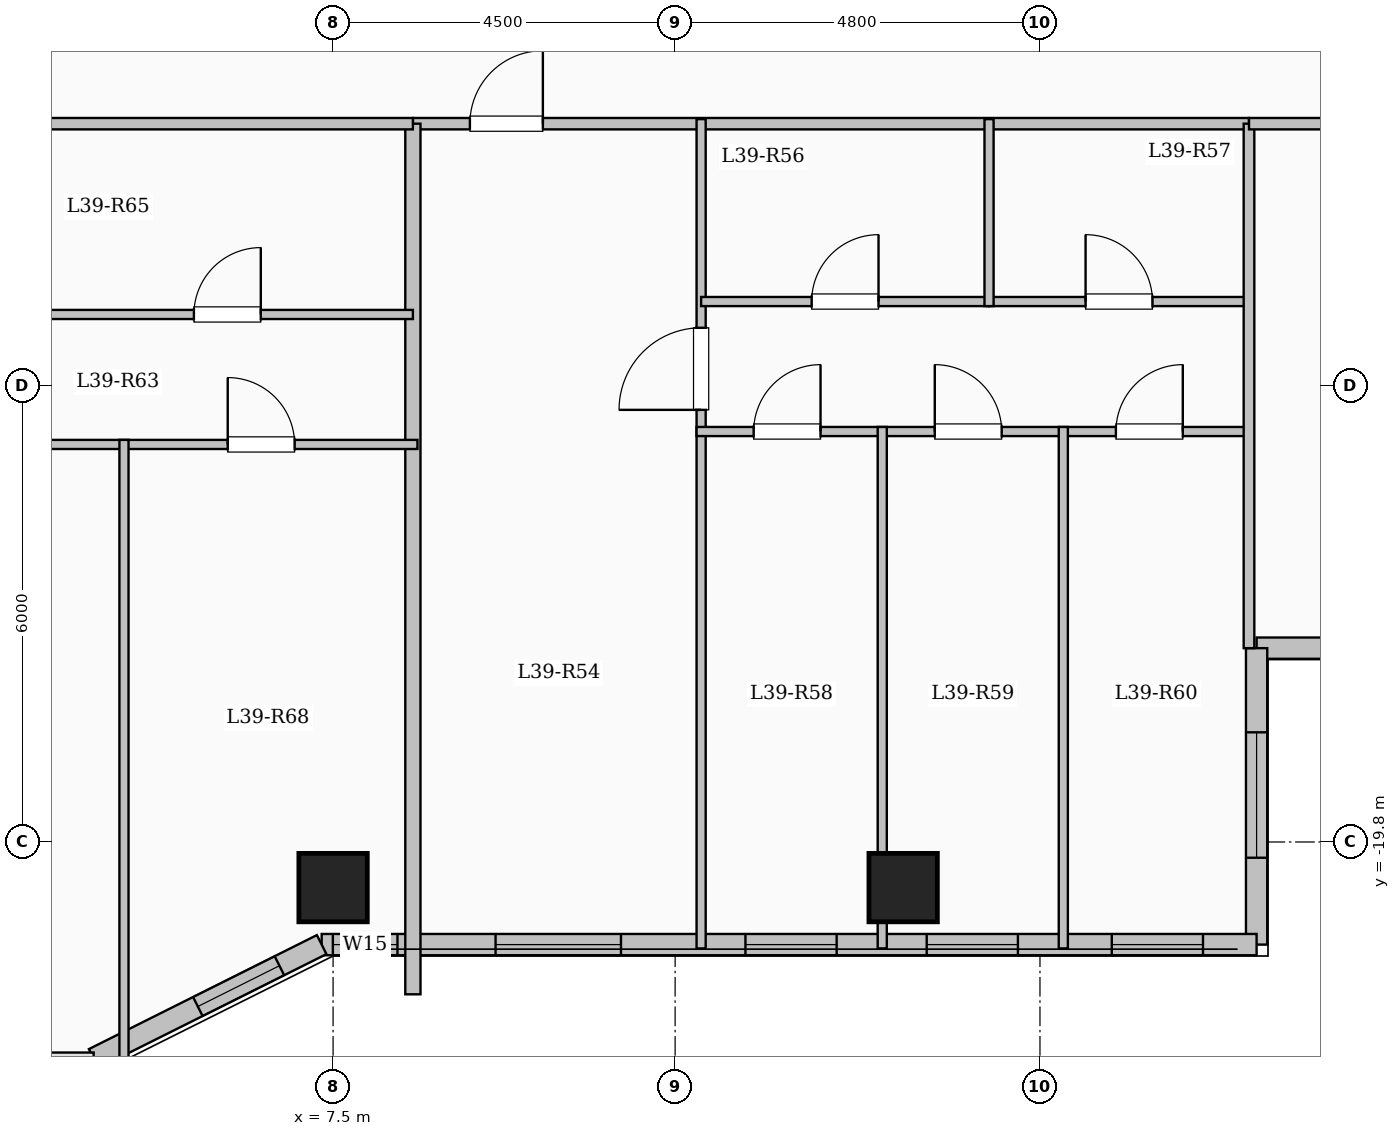
"""IFC4 building model, lengths in metres.
Left out: names, types, materials, properties, quantities, classifications, styles, units other than length and angle.
Written with IfcOpenShell. Run it as: python <this file> out.ifc"""

import sys

from ifc_helpers import new_model, si_unit, direction, frame, frame_2d, origin, origin_2d, place, context, subcontext, project, spatial, rectangle, extrude, element, fill, save


model = new_model("IFC4")
c1 = context("Model", 3, precision=1e-05, world=origin(), true_north=direction((0.0, 1.0)))
c2 = subcontext(c1, "Body", "Model", "MODEL_VIEW")
j1 = project(units=[si_unit("LENGTHUNIT", "METRE"), si_unit("PLANEANGLEUNIT", "RADIAN")], contexts=[c1])
p1 = place(None, origin())
s1 = spatial("IfcSite", under=j1, at=p1, CompositionType="ELEMENT")
p2 = place(p1, origin())
s2 = spatial("IfcBuilding", under=s1, at=p2, CompositionType="ELEMENT")
p3 = place(p2, frame((0.0, 0.0, 146.0)))
s3 = spatial("IfcBuildingStorey", under=s2, at=p3, CompositionType="ELEMENT", Elevation=146.0)
for number, where, z_axis, x_axis in (
    (1, (7.5, -20.4, 0.0), (0.0, 0.0, 1.0), (1.0, 0.0, 0.0)),
    (2, (15.0, -20.4, 0.0), (0.0, 0.0, 1.0), (1.0, 0.0, 0.0)),
):
    element("IfcColumn", number, at=place(p3, frame(where, z_axis=z_axis, x_axis=x_axis)), inside=s3, PredefinedType="COLUMN", context=c2, shape_type="SweptSolid", body=[
        extrude(rectangle(XDim=0.9, YDim=0.9, at=origin_2d()), origin(), (0.0, 0.0, 1.0), 3.35),
    ])
p4 = place(p3, frame((25.05, -17.25, 0.0), z_axis=(0.0, 0.0, 1.0), x_axis=(-1.0, 0.0, 0.0)))
e3 = element("IfcWall", 3, at=p4, inside=s3, PredefinedType="SOLIDWALL", context=c2, shape_type="SweptSolid", body=[
    extrude(rectangle(XDim=5.4, YDim=0.28, at=frame_2d((2.7, 0.0))), origin(), (0.0, 0.0, 1.0), 3.1),
])
p5 = place(p4, frame((1.625, 0.0, 0.9)))
e4 = element("IfcOpeningElement", 4, at=p5, cuts=e3, PredefinedType="OPENING", context=c2, shape_type="SweptSolid", body=[
    extrude(rectangle(XDim=2.2, YDim=1.75, at=frame_2d((1.1, 0.875))), frame((0.0, 0.15, 0.0), z_axis=(0.0, -1.0, 0.0), x_axis=(1.0, 0.0, 0.0)), (0.0, 0.0, 1.0), 0.3),
])
p6 = place(p3, frame((19.65, -17.25, 0.0), z_axis=(0.0, 0.0, 1.0), x_axis=(0.0, -1.0, 0.0)))
e5 = element("IfcWall", 5, at=p6, inside=s3, PredefinedType="SOLIDWALL", context=c2, shape_type="SweptSolid", body=[
    extrude(rectangle(XDim=3.9, YDim=0.28, at=frame_2d((1.95, 0.0))), origin(), (0.0, 0.0, 1.0), 3.1),
])
p7 = place(p6, frame((1.107, 0.0, 0.9)))
e6 = element("IfcOpeningElement", 6, at=p7, cuts=e5, PredefinedType="OPENING", context=c2, shape_type="SweptSolid", body=[
    extrude(rectangle(XDim=1.65, YDim=1.6, at=frame_2d((0.825, 0.8))), frame((0.0, 0.15, 0.0), z_axis=(0.0, -1.0, 0.0), x_axis=(1.0, 0.0, 0.0)), (0.0, 0.0, 1.0), 0.3),
])
p8 = place(p3, frame((19.65, -21.15, 0.0), z_axis=(0.0, 0.0, 1.0), x_axis=(-1.0, 0.0, 0.0)))
e7 = element("IfcWall", 7, at=p8, inside=s3, PredefinedType="SOLIDWALL", context=c2, shape_type="SweptSolid", body=[
    extrude(rectangle(XDim=12.3, YDim=0.28, at=frame_2d((6.15, 0.0))), origin(), (0.0, 0.0, 1.0), 3.1),
])
p9 = place(p8, frame((0.705, 0.0, 0.95)))
e8 = element("IfcOpeningElement", 8, at=p9, cuts=e7, PredefinedType="OPENING", context=c2, shape_type="SweptSolid", body=[
    extrude(rectangle(XDim=1.2, YDim=1.5, at=frame_2d((0.6, 0.75))), frame((0.0, 0.15, 0.0), z_axis=(0.0, -1.0, 0.0), x_axis=(1.0, 0.0, 0.0)), (0.0, 0.0, 1.0), 0.3),
])
p10 = place(p8, frame((3.14, 0.0, 0.95)))
e9 = element("IfcOpeningElement", 9, at=p10, cuts=e7, PredefinedType="OPENING", context=c2, shape_type="SweptSolid", body=[
    extrude(rectangle(XDim=1.2, YDim=1.5, at=frame_2d((0.6, 0.75))), frame((0.0, 0.15, 0.0), z_axis=(0.0, -1.0, 0.0), x_axis=(1.0, 0.0, 0.0)), (0.0, 0.0, 1.0), 0.3),
])
p11 = place(p8, frame((5.525, 0.0, 0.95)))
e10 = element("IfcOpeningElement", 10, at=p11, cuts=e7, PredefinedType="OPENING", context=c2, shape_type="SweptSolid", body=[
    extrude(rectangle(XDim=1.2, YDim=1.5, at=frame_2d((0.6, 0.75))), frame((0.0, 0.15, 0.0), z_axis=(0.0, -1.0, 0.0), x_axis=(1.0, 0.0, 0.0)), (0.0, 0.0, 1.0), 0.3),
])
p12 = place(p8, frame((8.362, 0.0, 0.9)))
e11 = element("IfcOpeningElement", 11, at=p12, cuts=e7, PredefinedType="OPENING", context=c2, shape_type="SweptSolid", body=[
    extrude(rectangle(XDim=1.65, YDim=1.6, at=frame_2d((0.825, 0.8))), frame((0.0, 0.15, 0.0), z_axis=(0.0, -1.0, 0.0), x_axis=(1.0, 0.0, 0.0)), (0.0, 0.0, 1.0), 0.3),
])
p13 = place(p8, frame((11.303, 0.0, 0.95)))
e12 = element("IfcOpeningElement", 12, at=p13, cuts=e7, PredefinedType="OPENING", context=c2, shape_type="SweptSolid", body=[
    extrude(rectangle(XDim=0.85, YDim=1.5, at=frame_2d((0.425, 0.75))), frame((0.0, 0.15, 0.0), z_axis=(0.0, -1.0, 0.0), x_axis=(1.0, 0.0, 0.0)), (0.0, 0.0, 1.0), 0.3),
])
p14 = place(p3, frame((7.35, -21.15, 0.0), z_axis=(0.0, 0.0, 1.0), x_axis=(-0.894427191, -0.4472135955, 0.0)))
e13 = element("IfcWall", 13, at=p14, inside=s3, PredefinedType="SOLIDWALL", context=c2, shape_type="SweptSolid", body=[
    extrude(rectangle(XDim=3.354, YDim=0.28, at=frame_2d((1.677, 0.0))), origin(), (0.0, 0.0, 1.0), 3.1),
])
p15 = place(p14, frame((0.622, 0.0, 0.95)))
e14 = element("IfcOpeningElement", 14, at=p15, cuts=e13, PredefinedType="OPENING", context=c2, shape_type="SweptSolid", body=[
    extrude(rectangle(XDim=1.2, YDim=1.5, at=frame_2d((0.6, 0.75))), frame((0.0, 0.15, 0.0), z_axis=(0.0, -1.0, 0.0), x_axis=(1.0, 0.0, 0.0)), (0.0, 0.0, 1.0), 0.3),
])
p16 = place(p3, frame((8.55, -10.35, 0.0), z_axis=(0.0, 0.0, 1.0), x_axis=(1.0, 0.0, 0.0)))
e15 = element("IfcWall", 15, at=p16, inside=s3, PredefinedType="PARTITIONING", context=c2, shape_type="SweptSolid", body=[
    extrude(rectangle(XDim=11.0, YDim=0.15, at=frame_2d((5.5, 0.0))), origin(), (0.0, 0.0, 1.0), 3.1),
])
p17 = place(p16, frame((0.75, 0.0, 0.0)))
e16 = element("IfcOpeningElement", 16, at=p17, cuts=e15, PredefinedType="OPENING", context=c2, shape_type="SweptSolid", body=[
    extrude(rectangle(XDim=0.96, YDim=2.15, at=frame_2d((0.48, 1.075))), frame((0.0, 0.085, 0.0), z_axis=(0.0, -1.0, 0.0), x_axis=(1.0, 0.0, 0.0)), (0.0, 0.0, 1.0), 0.17),
])
p18 = place(p3, frame((12.342, -21.2, 0.0), z_axis=(0.0, 0.0, 1.0), x_axis=(0.0, 1.0, 0.0)))
e17 = element("IfcWall", 17, at=p18, inside=s3, PredefinedType="PARTITIONING", context=c2, shape_type="SweptSolid", body=[
    extrude(rectangle(XDim=10.91, YDim=0.12, at=frame_2d((5.455, 0.0))), origin(), (0.0, 0.0, 1.0), 3.1),
])
p19 = place(p18, frame((7.085, 0.0, 0.0)))
e18 = element("IfcOpeningElement", 18, at=p19, cuts=e17, PredefinedType="OPENING", context=c2, shape_type="SweptSolid", body=[
    extrude(rectangle(XDim=1.08, YDim=2.15, at=frame_2d((0.54, 1.075))), frame((0.0, 0.07, 0.0), z_axis=(0.0, -1.0, 0.0), x_axis=(1.0, 0.0, 0.0)), (0.0, 0.0, 1.0), 0.14),
])
p20 = place(p3, frame((12.342, -12.69, 0.0), z_axis=(0.0, 0.0, 1.0), x_axis=(1.0, 0.0, 0.0)))
e19 = element("IfcWall", 19, at=p20, inside=s3, PredefinedType="PARTITIONING", context=c2, shape_type="SweptSolid", body=[
    extrude(rectangle(XDim=3.788, YDim=0.12, at=frame_2d((1.894, 0.0))), origin(), (0.0, 0.0, 1.0), 3.1),
])
p21 = place(p20, frame((1.454, 0.0, 0.0)))
e20 = element("IfcOpeningElement", 20, at=p21, cuts=e19, PredefinedType="OPENING", context=c2, shape_type="SweptSolid", body=[
    extrude(rectangle(XDim=0.88, YDim=2.1, at=frame_2d((0.44, 1.05))), frame((0.0, 0.07, 0.0), z_axis=(0.0, -1.0, 0.0), x_axis=(1.0, 0.0, 0.0)), (0.0, 0.0, 1.0), 0.14),
])
p22 = place(p3, frame((16.13, -12.69, 0.0), z_axis=(0.0, 0.0, 1.0), x_axis=(1.0, 0.0, 0.0)))
e21 = element("IfcWall", 21, at=p22, inside=s3, PredefinedType="PARTITIONING", context=c2, shape_type="SweptSolid", body=[
    extrude(rectangle(XDim=3.42, YDim=0.12, at=frame_2d((1.71, 0.0))), origin(), (0.0, 0.0, 1.0), 3.1),
])
p23 = place(p22, frame((1.27, 0.0, 0.0)))
e22 = element("IfcOpeningElement", 22, at=p23, cuts=e21, PredefinedType="OPENING", context=c2, shape_type="SweptSolid", body=[
    extrude(rectangle(XDim=0.88, YDim=2.1, at=frame_2d((0.44, 1.05))), frame((0.0, 0.07, 0.0), z_axis=(0.0, -1.0, 0.0), x_axis=(1.0, 0.0, 0.0)), (0.0, 0.0, 1.0), 0.14),
])
p24 = place(p3, frame((12.282, -14.4, 0.0), z_axis=(0.0, 0.0, 1.0), x_axis=(1.0, 0.0, 0.0)))
e23 = element("IfcWall", 23, at=p24, inside=s3, PredefinedType="PARTITIONING", context=c2, shape_type="SweptSolid", body=[
    extrude(rectangle(XDim=7.328, YDim=0.12, at=frame_2d((3.664, 0.0))), origin(), (0.0, 0.0, 1.0), 3.1),
])
p25 = place(p24, frame((0.751, 0.0, 0.0)))
e24 = element("IfcOpeningElement", 24, at=p25, cuts=e23, PredefinedType="OPENING", context=c2, shape_type="SweptSolid", body=[
    extrude(rectangle(XDim=0.88, YDim=2.1, at=frame_2d((0.44, 1.05))), frame((0.0, 0.07, 0.0), z_axis=(0.0, -1.0, 0.0), x_axis=(1.0, 0.0, 0.0)), (0.0, 0.0, 1.0), 0.14),
])
p26 = place(p24, frame((3.134, 0.0, 0.0)))
e25 = element("IfcOpeningElement", 25, at=p26, cuts=e23, PredefinedType="OPENING", context=c2, shape_type="SweptSolid", body=[
    extrude(rectangle(XDim=0.88, YDim=2.1, at=frame_2d((0.44, 1.05))), frame((0.0, 0.07, 0.0), z_axis=(0.0, -1.0, 0.0), x_axis=(1.0, 0.0, 0.0)), (0.0, 0.0, 1.0), 0.14),
])
p27 = place(p24, frame((5.517, 0.0, 0.0)))
e26 = element("IfcOpeningElement", 26, at=p27, cuts=e23, PredefinedType="OPENING", context=c2, shape_type="SweptSolid", body=[
    extrude(rectangle(XDim=0.88, YDim=2.1, at=frame_2d((0.44, 1.05))), frame((0.0, 0.07, 0.0), z_axis=(0.0, -1.0, 0.0), x_axis=(1.0, 0.0, 0.0)), (0.0, 0.0, 1.0), 0.14),
])
p28 = place(p3, frame((16.13, -12.75, 0.0), z_axis=(0.0, 0.0, 1.0), x_axis=(0.0, 1.0, 0.0)))
e27 = element("IfcWall", 27, at=p28, inside=s3, PredefinedType="PARTITIONING", context=c2, shape_type="SweptSolid", body=[
    extrude(rectangle(XDim=2.46, YDim=0.12, at=frame_2d((1.23, 0.0))), origin(), (0.0, 0.0, 1.0), 3.1),
])
p29 = place(p3, frame((14.725, -21.2, 0.0), z_axis=(0.0, 0.0, 1.0), x_axis=(0.0, 1.0, 0.0)))
e28 = element("IfcWall", 28, at=p29, inside=s3, PredefinedType="PARTITIONING", context=c2, shape_type="SweptSolid", body=[
    extrude(rectangle(XDim=6.86, YDim=0.12, at=frame_2d((3.43, 0.0))), origin(), (0.0, 0.0, 1.0), 2.585),
])
p30 = place(p3, frame((17.107, -21.2, 0.0), z_axis=(0.0, 0.0, 1.0), x_axis=(0.0, 1.0, 0.0)))
e29 = element("IfcWall", 29, at=p30, inside=s3, PredefinedType="PARTITIONING", context=c2, shape_type="SweptSolid", body=[
    extrude(rectangle(XDim=6.86, YDim=0.12, at=frame_2d((3.43, 0.0))), origin(), (0.0, 0.0, 1.0), 3.1),
])
p31 = place(p3, frame((8.55, -21.804, 0.0), z_axis=(0.0, 0.0, 1.0), x_axis=(0.0, 1.0, 0.0)))
e30 = element("IfcWall", 30, at=p31, inside=s3, PredefinedType="SOLIDWALL", context=c2, shape_type="SweptSolid", body=[
    extrude(rectangle(XDim=11.454, YDim=0.2, at=frame_2d((5.727, 0.0))), origin(), (0.0, 0.0, 1.0), 3.1),
])
p32 = place(p3, frame((-8.55, -10.35, 0.0), z_axis=(0.0, 0.0, 1.0), x_axis=(1.0, 0.0, 0.0)))
e31 = element("IfcWall", 31, at=p32, inside=s3, PredefinedType="PARTITIONING", context=c2, shape_type="SweptSolid", body=[
    extrude(rectangle(XDim=17.1, YDim=0.15, at=frame_2d((8.55, 0.0))), origin(), (0.0, 0.0, 1.0), 3.1),
])
p33 = place(p32, frame((1.6, 0.0, 0.0)))
e32 = element("IfcOpeningElement", 32, at=p33, cuts=e31, PredefinedType="OPENING", context=c2, shape_type="SweptSolid", body=[
    extrude(rectangle(XDim=0.96, YDim=2.15, at=frame_2d((0.48, 1.075))), frame((0.0, 0.085, 0.0), z_axis=(0.0, -1.0, 0.0), x_axis=(1.0, 0.0, 0.0)), (0.0, 0.0, 1.0), 0.17),
])
p34 = place(p3, frame((3.667, -12.86, 0.0), z_axis=(0.0, 0.0, 1.0), x_axis=(1.0, 0.0, 0.0)))
e33 = element("IfcWall", 33, at=p34, inside=s3, PredefinedType="PARTITIONING", context=c2, shape_type="SweptSolid", body=[
    extrude(rectangle(XDim=4.883, YDim=0.12, at=frame_2d((2.441, 0.0))), origin(), (0.0, 0.0, 1.0), 3.1),
])
p35 = place(p34, frame((2.002, 0.0, 0.0)))
e34 = element("IfcOpeningElement", 34, at=p35, cuts=e33, PredefinedType="OPENING", context=c2, shape_type="SweptSolid", body=[
    extrude(rectangle(XDim=0.88, YDim=2.1, at=frame_2d((0.44, 1.05))), frame((0.0, 0.07, 0.0), z_axis=(0.0, -1.0, 0.0), x_axis=(1.0, 0.0, 0.0)), (0.0, 0.0, 1.0), 0.14),
])
p36 = place(p3, frame((-2.774, -14.57, 0.0), z_axis=(0.0, 0.0, 1.0), x_axis=(1.0, 0.0, 0.0)))
e35 = element("IfcWall", 35, at=p36, inside=s3, PredefinedType="PARTITIONING", context=c2, shape_type="SweptSolid", body=[
    extrude(rectangle(XDim=11.384, YDim=0.12, at=frame_2d((5.692, 0.0))), origin(), (0.0, 0.0, 1.0), 3.1),
])
p37 = place(p36, frame((1.426, 0.0, 0.0)))
e36 = element("IfcOpeningElement", 36, at=p37, cuts=e35, PredefinedType="OPENING", context=c2, shape_type="SweptSolid", body=[
    extrude(rectangle(XDim=0.88, YDim=2.1, at=frame_2d((0.44, 1.05))), frame((0.0, 0.07, 0.0), z_axis=(0.0, -1.0, 0.0), x_axis=(1.0, 0.0, 0.0)), (0.0, 0.0, 1.0), 0.14),
])
p38 = place(p36, frame((5.157, 0.0, 0.0)))
e37 = element("IfcOpeningElement", 37, at=p38, cuts=e35, PredefinedType="OPENING", context=c2, shape_type="SweptSolid", body=[
    extrude(rectangle(XDim=0.88, YDim=2.1, at=frame_2d((0.44, 1.05))), frame((0.0, 0.07, 0.0), z_axis=(0.0, -1.0, 0.0), x_axis=(1.0, 0.0, 0.0)), (0.0, 0.0, 1.0), 0.14),
])
p39 = place(p36, frame((8.888, 0.0, 0.0)))
e38 = element("IfcOpeningElement", 38, at=p39, cuts=e35, PredefinedType="OPENING", context=c2, shape_type="SweptSolid", body=[
    extrude(rectangle(XDim=0.88, YDim=2.1, at=frame_2d((0.44, 1.05))), frame((0.0, 0.07, 0.0), z_axis=(0.0, -1.0, 0.0), x_axis=(1.0, 0.0, 0.0)), (0.0, 0.0, 1.0), 0.14),
])
p40 = place(p3, frame((4.749, -22.68, 0.0), z_axis=(0.0, 0.0, 1.0), x_axis=(0.0, 1.0, 0.0)))
e39 = element("IfcWall", 39, at=p40, inside=s3, PredefinedType="PARTITIONING", context=c2, shape_type="SweptSolid", body=[
    extrude(rectangle(XDim=8.17, YDim=0.12, at=frame_2d((4.085, 0.0))), origin(), (0.0, 0.0, 1.0), 3.1),
])
p41 = place(p3, frame((19.55, -17.25, 0.0), z_axis=(0.0, 0.0, 1.0), x_axis=(0.0, 1.0, 0.0)))
e40 = element("IfcWall", 40, at=p41, inside=s3, PredefinedType="PARTITIONING", context=c2, shape_type="SweptSolid", body=[
    extrude(rectangle(XDim=6.9, YDim=0.14, at=frame_2d((3.45, 0.0))), origin(), (0.0, 0.0, 1.0), 3.1),
])
p42 = place(p3, frame((19.55, -10.35, 0.0), z_axis=(0.0, 0.0, 1.0), x_axis=(1.0, 0.0, 0.0)))
e41 = element("IfcWall", 41, at=p42, inside=s3, PredefinedType="PARTITIONING", context=c2, shape_type="SweptSolid", body=[
    extrude(rectangle(XDim=5.53, YDim=0.15, at=frame_2d((2.765, 0.0))), origin(), (0.0, 0.0, 1.0), 3.1),
])
p43 = place(p42, frame((2.29, 0.0, 0.0)))
e42 = element("IfcOpeningElement", 42, at=p43, cuts=e41, PredefinedType="OPENING", context=c2, shape_type="SweptSolid", body=[
    extrude(rectangle(XDim=0.95, YDim=2.15, at=frame_2d((0.475, 1.075))), frame((0.0, 0.085, 0.0), z_axis=(0.0, -1.0, 0.0), x_axis=(1.0, 0.0, 0.0)), (0.0, 0.0, 1.0), 0.17),
])
p44 = place(p7, origin())
e43 = element("IfcWindow", 43, at=p44, inside=s3, PartitioningType="SINGLE_PANEL", PredefinedType="WINDOW", context=c2, shape_type="SweptSolid", body=[
    extrude(rectangle(XDim=1.65, YDim=1.6, at=frame_2d((0.825, 0.8))), frame((0.0, 0.03, 0.0), z_axis=(0.0, -1.0, 0.0), x_axis=(1.0, 0.0, 0.0)), (0.0, 0.0, 1.0), 0.06),
])
fill(e6, e43)
p45 = place(p9, origin())
e44 = element("IfcWindow", 44, at=p45, inside=s3, PartitioningType="SINGLE_PANEL", PredefinedType="WINDOW", context=c2, shape_type="SweptSolid", body=[
    extrude(rectangle(XDim=1.2, YDim=1.5, at=frame_2d((0.6, 0.75))), frame((0.0, 0.03, 0.0), z_axis=(0.0, -1.0, 0.0), x_axis=(1.0, 0.0, 0.0)), (0.0, 0.0, 1.0), 0.06),
])
fill(e8, e44)
p46 = place(p10, origin())
e45 = element("IfcWindow", 45, at=p46, inside=s3, PartitioningType="SINGLE_PANEL", PredefinedType="WINDOW", context=c2, shape_type="SweptSolid", body=[
    extrude(rectangle(XDim=1.2, YDim=1.5, at=frame_2d((0.6, 0.75))), frame((0.0, 0.03, 0.0), z_axis=(0.0, -1.0, 0.0), x_axis=(1.0, 0.0, 0.0)), (0.0, 0.0, 1.0), 0.06),
])
fill(e9, e45)
p47 = place(p11, origin())
e46 = element("IfcWindow", 46, at=p47, inside=s3, PartitioningType="SINGLE_PANEL", PredefinedType="WINDOW", context=c2, shape_type="SweptSolid", body=[
    extrude(rectangle(XDim=1.2, YDim=1.5, at=frame_2d((0.6, 0.75))), frame((0.0, 0.03, 0.0), z_axis=(0.0, -1.0, 0.0), x_axis=(1.0, 0.0, 0.0)), (0.0, 0.0, 1.0), 0.06),
])
fill(e10, e46)
p48 = place(p12, origin())
e47 = element("IfcWindow", 47, at=p48, inside=s3, PartitioningType="SINGLE_PANEL", PredefinedType="WINDOW", context=c2, shape_type="SweptSolid", body=[
    extrude(rectangle(XDim=1.65, YDim=1.6, at=frame_2d((0.825, 0.8))), frame((0.0, 0.03, 0.0), z_axis=(0.0, -1.0, 0.0), x_axis=(1.0, 0.0, 0.0)), (0.0, 0.0, 1.0), 0.06),
])
fill(e11, e47)
p49 = place(p13, origin())
e48 = element("IfcWindow", 48, at=p49, inside=s3, PartitioningType="SINGLE_PANEL", PredefinedType="WINDOW", context=c2, shape_type="SweptSolid", body=[
    extrude(rectangle(XDim=0.85, YDim=1.5, at=frame_2d((0.425, 0.75))), frame((0.0, 0.03, 0.0), z_axis=(0.0, -1.0, 0.0), x_axis=(1.0, 0.0, 0.0)), (0.0, 0.0, 1.0), 0.06),
])
fill(e12, e48)
p50 = place(p15, origin())
e49 = element("IfcWindow", 49, at=p50, inside=s3, PartitioningType="SINGLE_PANEL", PredefinedType="WINDOW", context=c2, shape_type="SweptSolid", body=[
    extrude(rectangle(XDim=1.2, YDim=1.5, at=frame_2d((0.6, 0.75))), frame((0.0, 0.03, 0.0), z_axis=(0.0, -1.0, 0.0), x_axis=(1.0, 0.0, 0.0)), (0.0, 0.0, 1.0), 0.06),
])
fill(e14, e49)
p51 = place(p17, origin())
e50 = element("IfcDoor", 50, at=p51, inside=s3, OperationType="SINGLE_SWING_RIGHT", PredefinedType="DOOR", context=c2, shape_type="SweptSolid", body=[
    extrude(rectangle(XDim=0.96, YDim=2.15, at=frame_2d((0.48, 1.075))), frame((0.0, 0.025, 0.0), z_axis=(0.0, -1.0, 0.0), x_axis=(1.0, 0.0, 0.0)), (0.0, 0.0, 1.0), 0.05),
])
fill(e16, e50)
p52 = place(p19, origin())
e51 = element("IfcDoor", 51, at=p52, inside=s3, OperationType="SINGLE_SWING_LEFT", PredefinedType="DOOR", context=c2, shape_type="SweptSolid", body=[
    extrude(rectangle(XDim=1.08, YDim=2.15, at=frame_2d((0.54, 1.075))), frame((0.0, 0.025, 0.0), z_axis=(0.0, -1.0, 0.0), x_axis=(1.0, 0.0, 0.0)), (0.0, 0.0, 1.0), 0.05),
])
fill(e18, e51)
p53 = place(p21, origin())
e52 = element("IfcDoor", 52, at=p53, inside=s3, OperationType="SINGLE_SWING_RIGHT", PredefinedType="DOOR", context=c2, shape_type="SweptSolid", body=[
    extrude(rectangle(XDim=0.88, YDim=2.1, at=frame_2d((0.44, 1.05))), frame((0.0, 0.025, 0.0), z_axis=(0.0, -1.0, 0.0), x_axis=(1.0, 0.0, 0.0)), (0.0, 0.0, 1.0), 0.05),
])
fill(e20, e52)
p54 = place(p23, origin())
e53 = element("IfcDoor", 53, at=p54, inside=s3, OperationType="SINGLE_SWING_LEFT", PredefinedType="DOOR", context=c2, shape_type="SweptSolid", body=[
    extrude(rectangle(XDim=0.88, YDim=2.1, at=frame_2d((0.44, 1.05))), frame((0.0, 0.025, 0.0), z_axis=(0.0, -1.0, 0.0), x_axis=(1.0, 0.0, 0.0)), (0.0, 0.0, 1.0), 0.05),
])
fill(e22, e53)
p55 = place(p25, origin())
e54 = element("IfcDoor", 54, at=p55, inside=s3, OperationType="SINGLE_SWING_RIGHT", PredefinedType="DOOR", context=c2, shape_type="SweptSolid", body=[
    extrude(rectangle(XDim=0.88, YDim=2.1, at=frame_2d((0.44, 1.05))), frame((0.0, 0.025, 0.0), z_axis=(0.0, -1.0, 0.0), x_axis=(1.0, 0.0, 0.0)), (0.0, 0.0, 1.0), 0.05),
])
fill(e24, e54)
p56 = place(p26, origin())
e55 = element("IfcDoor", 55, at=p56, inside=s3, OperationType="SINGLE_SWING_LEFT", PredefinedType="DOOR", context=c2, shape_type="SweptSolid", body=[
    extrude(rectangle(XDim=0.88, YDim=2.1, at=frame_2d((0.44, 1.05))), frame((0.0, 0.025, 0.0), z_axis=(0.0, -1.0, 0.0), x_axis=(1.0, 0.0, 0.0)), (0.0, 0.0, 1.0), 0.05),
])
fill(e25, e55)
p57 = place(p27, origin())
e56 = element("IfcDoor", 56, at=p57, inside=s3, OperationType="SINGLE_SWING_RIGHT", PredefinedType="DOOR", context=c2, shape_type="SweptSolid", body=[
    extrude(rectangle(XDim=0.88, YDim=2.1, at=frame_2d((0.44, 1.05))), frame((0.0, 0.025, 0.0), z_axis=(0.0, -1.0, 0.0), x_axis=(1.0, 0.0, 0.0)), (0.0, 0.0, 1.0), 0.05),
])
fill(e26, e56)
p58 = place(p35, origin())
e57 = element("IfcDoor", 57, at=p58, inside=s3, OperationType="SINGLE_SWING_RIGHT", PredefinedType="DOOR", context=c2, shape_type="SweptSolid", body=[
    extrude(rectangle(XDim=0.88, YDim=2.1, at=frame_2d((0.44, 1.05))), frame((0.0, 0.025, 0.0), z_axis=(0.0, -1.0, 0.0), x_axis=(1.0, 0.0, 0.0)), (0.0, 0.0, 1.0), 0.05),
])
fill(e34, e57)
p59 = place(p39, origin())
e58 = element("IfcDoor", 58, at=p59, inside=s3, OperationType="SINGLE_SWING_LEFT", PredefinedType="DOOR", context=c2, shape_type="SweptSolid", body=[
    extrude(rectangle(XDim=0.88, YDim=2.1, at=frame_2d((0.44, 1.05))), frame((0.0, 0.025, 0.0), z_axis=(0.0, -1.0, 0.0), x_axis=(1.0, 0.0, 0.0)), (0.0, 0.0, 1.0), 0.05),
])
fill(e38, e58)
save(model, sys.argv[1])
